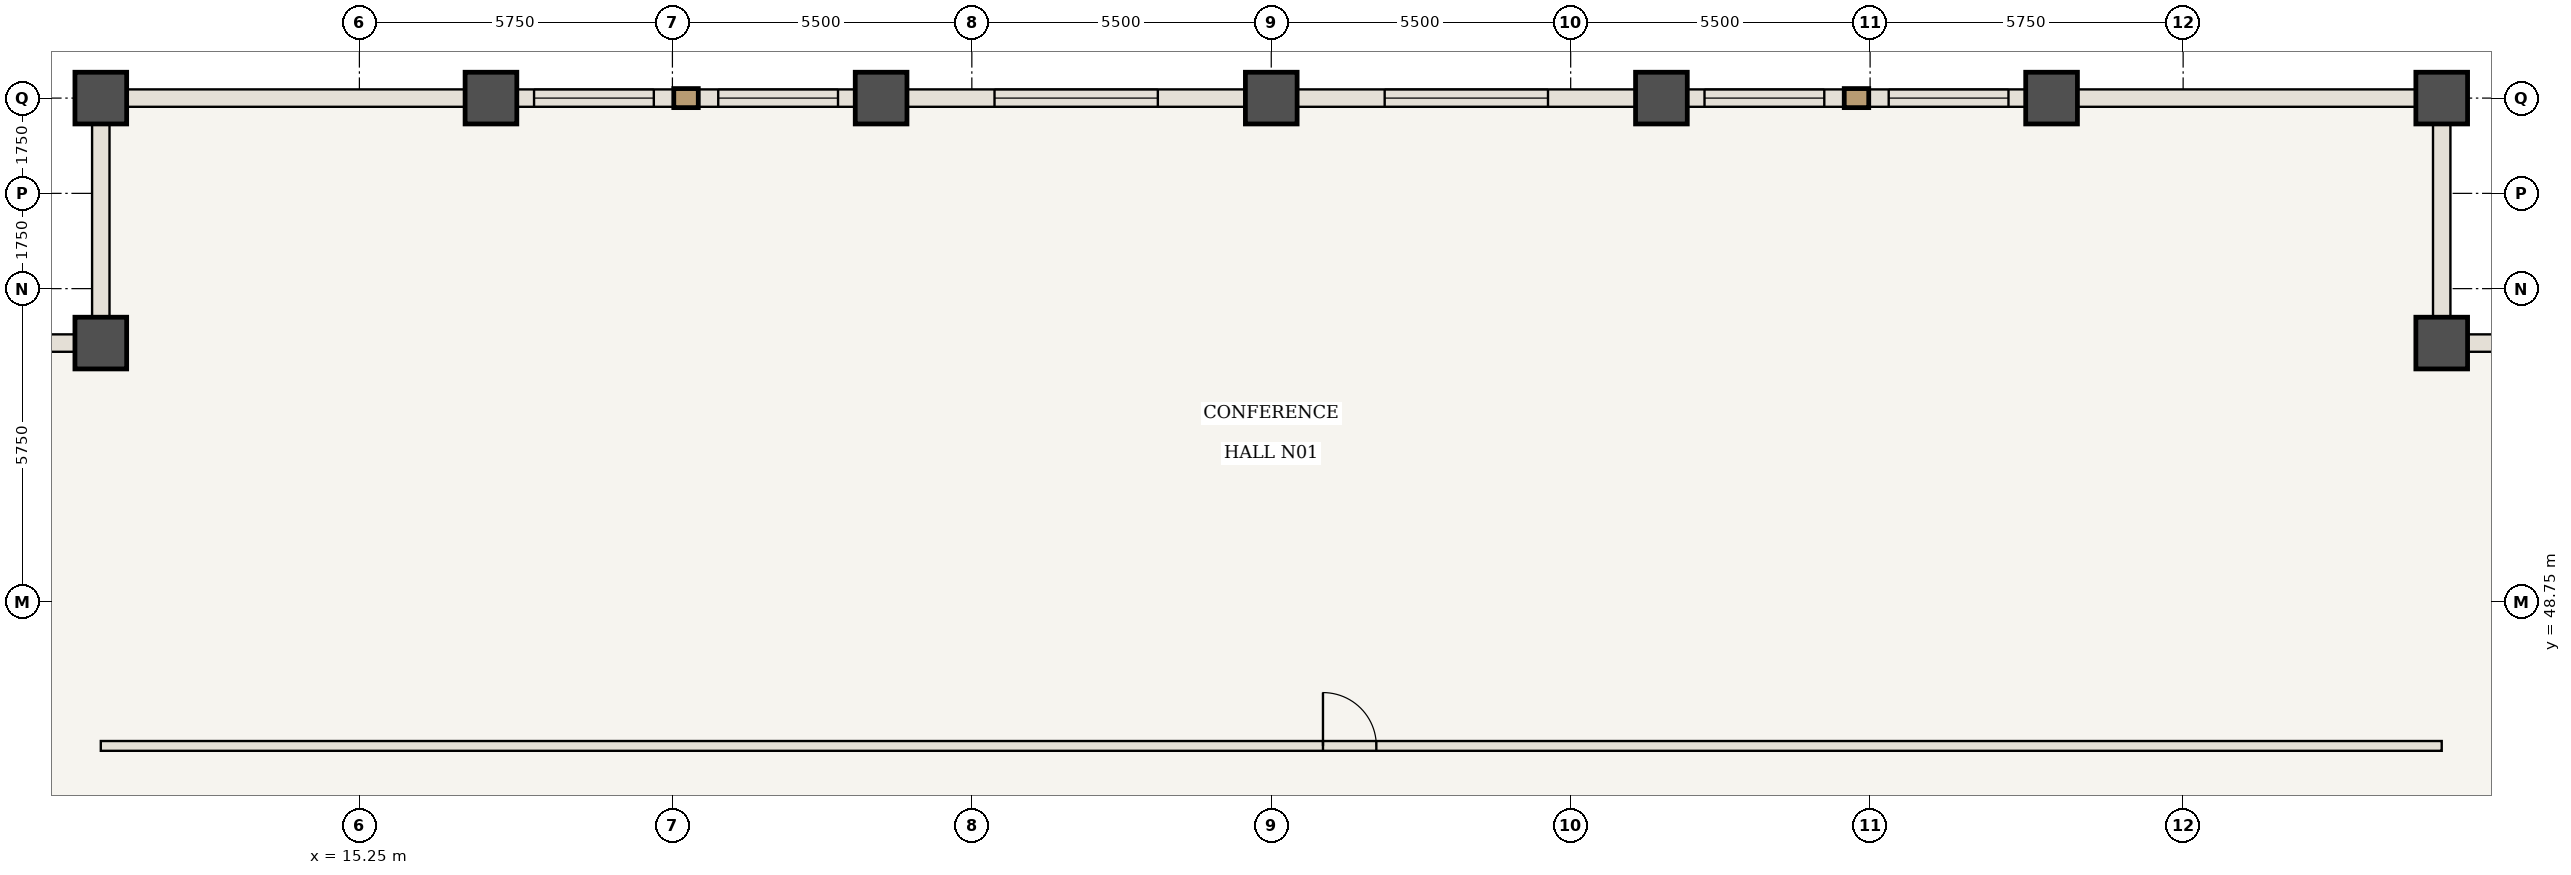
"""IFC4 building model, lengths in metres.
Left out: names, types, materials, properties, quantities, classifications, styles, units other than length and angle.
Written with IfcOpenShell. Run it as: python <this file> out.ifc"""

import sys

from ifc_helpers import new_model, si_unit, direction, frame, frame_2d, origin, origin_2d, place, context, subcontext, project, spatial, rectangle, extrude, element, fill, save


model = new_model("IFC4")
c1 = context("Model", 3, precision=1e-05, world=origin(), true_north=direction((0.0, 1.0)))
c2 = subcontext(c1, "Body", "Model", "MODEL_VIEW")
j1 = project(units=[si_unit("LENGTHUNIT", "METRE"), si_unit("PLANEANGLEUNIT", "RADIAN")], contexts=[c1])
p1 = place(None, origin())
s1 = spatial("IfcSite", under=j1, at=p1, CompositionType="ELEMENT")
p2 = place(p1, origin())
s2 = spatial("IfcBuilding", under=s1, at=p2, CompositionType="ELEMENT")
p3 = place(p2, frame((0.0, 0.0, 152.95)))
s3 = spatial("IfcBuildingStorey", under=s2, at=p3, CompositionType="ELEMENT", Elevation=152.95)
for number, where, z_axis, x_axis in (
    (1, (53.5, 53.5, 0.0), (0.0, 0.0, 1.0), (1.0, 0.0, 0.0)),
    (2, (53.5, 58.0, 0.0), (0.0, 0.0, 1.0), (1.0, 0.0, 0.0)),
    (3, (10.5, 58.0, 0.0), (0.0, 0.0, 1.0), (1.0, 0.0, 0.0)),
    (4, (10.5, 53.5, 0.0), (0.0, 0.0, 1.0), (1.0, 0.0, 0.0)),
    (5, (17.667, 58.0, 0.0), (0.0, 0.0, 1.0), (1.0, 0.0, 0.0)),
    (6, (24.833, 58.0, 0.0), (0.0, 0.0, 1.0), (1.0, 0.0, 0.0)),
    (7, (32.0, 58.0, 0.0), (0.0, 0.0, 1.0), (1.0, 0.0, 0.0)),
    (8, (39.167, 58.0, 0.0), (0.0, 0.0, 1.0), (1.0, 0.0, 0.0)),
    (9, (46.333, 58.0, 0.0), (0.0, 0.0, 1.0), (1.0, 0.0, 0.0)),
):
    element("IfcColumn", number, at=place(p3, frame(where, z_axis=z_axis, x_axis=x_axis)), inside=s3, PredefinedType="COLUMN", context=c2, shape_type="SweptSolid", body=[
        extrude(rectangle(XDim=0.95, YDim=0.95, at=origin_2d()), origin(), (0.0, 0.0, 1.0), 3.85),
    ])
p4 = place(p3, frame((10.5, 46.1, 0.0), z_axis=(0.0, 0.0, 1.0), x_axis=(1.0, 0.0, 0.0)))
e10 = element("IfcWall", 10, at=p4, inside=s3, PredefinedType="STANDARD", context=c2, shape_type="SweptSolid", body=[
    extrude(rectangle(XDim=43.0, YDim=0.18, at=frame_2d((21.5, 0.0))), origin(), (0.0, 0.0, 1.0), 3.685),
])
p5 = place(p4, frame((22.45, 0.0, 0.0)))
e11 = element("IfcOpeningElement", 11, at=p5, cuts=e10, PredefinedType="OPENING", context=c2, shape_type="SweptSolid", body=[
    extrude(rectangle(XDim=0.98, YDim=2.2, at=frame_2d((0.49, 1.1))), frame((0.0, 0.1, 0.0), z_axis=(0.0, -1.0, 0.0), x_axis=(1.0, 0.0, 0.0)), (0.0, 0.0, 1.0), 0.2),
])
p6 = place(p3, frame((10.5, 58.0, 0.0), z_axis=(0.0, 0.0, 1.0), x_axis=(1.0, 0.0, 0.0)))
e12 = element("IfcWall", 12, at=p6, inside=s3, PredefinedType="USERDEFINED", context=c2, shape_type="SweptSolid", body=[
    extrude(rectangle(XDim=7.167, YDim=0.32, at=frame_2d((3.583, 0.0))), origin(), (0.0, 0.0, 1.0), 2.885),
])
p7 = place(p3, frame((17.667, 58.0, 0.0), z_axis=(0.0, 0.0, 1.0), x_axis=(1.0, 0.0, 0.0)))
e13 = element("IfcWall", 13, at=p7, inside=s3, PredefinedType="USERDEFINED", context=c2, shape_type="SweptSolid", body=[
    extrude(rectangle(XDim=7.167, YDim=0.32, at=frame_2d((3.583, 0.0))), origin(), (0.0, 0.0, 1.0), 2.885),
])
p8 = place(p7, frame((0.792, 0.0, 0.85)))
e14 = element("IfcOpeningElement", 14, at=p8, cuts=e13, PredefinedType="OPENING", context=c2, shape_type="SweptSolid", body=[
    extrude(rectangle(XDim=2.2, YDim=1.835, at=frame_2d((1.1, 0.917))), frame((0.0, 0.17, 0.0), z_axis=(0.0, -1.0, 0.0), x_axis=(1.0, 0.0, 0.0)), (0.0, 0.0, 1.0), 0.34),
])
p9 = place(p7, frame((4.175, 0.0, 0.85)))
e15 = element("IfcOpeningElement", 15, at=p9, cuts=e13, PredefinedType="OPENING", context=c2, shape_type="SweptSolid", body=[
    extrude(rectangle(XDim=2.2, YDim=1.835, at=frame_2d((1.1, 0.917))), frame((0.0, 0.17, 0.0), z_axis=(0.0, -1.0, 0.0), x_axis=(1.0, 0.0, 0.0)), (0.0, 0.0, 1.0), 0.34),
])
p10 = place(p3, frame((24.833, 58.0, 0.0), z_axis=(0.0, 0.0, 1.0), x_axis=(1.0, 0.0, 0.0)))
e16 = element("IfcWall", 16, at=p10, inside=s3, PredefinedType="USERDEFINED", context=c2, shape_type="SweptSolid", body=[
    extrude(rectangle(XDim=7.167, YDim=0.32, at=frame_2d((3.583, 0.0))), origin(), (0.0, 0.0, 1.0), 2.885),
])
p11 = place(p10, frame((2.083, 0.0, 0.85)))
e17 = element("IfcOpeningElement", 17, at=p11, cuts=e16, PredefinedType="OPENING", context=c2, shape_type="SweptSolid", body=[
    extrude(rectangle(XDim=3.0, YDim=1.835, at=frame_2d((1.5, 0.917))), frame((0.0, 0.17, 0.0), z_axis=(0.0, -1.0, 0.0), x_axis=(1.0, 0.0, 0.0)), (0.0, 0.0, 1.0), 0.34),
])
p12 = place(p3, frame((32.0, 58.0, 0.0), z_axis=(0.0, 0.0, 1.0), x_axis=(1.0, 0.0, 0.0)))
e18 = element("IfcWall", 18, at=p12, inside=s3, PredefinedType="USERDEFINED", context=c2, shape_type="SweptSolid", body=[
    extrude(rectangle(XDim=7.167, YDim=0.32, at=frame_2d((3.583, 0.0))), origin(), (0.0, 0.0, 1.0), 2.885),
])
p13 = place(p12, frame((2.083, 0.0, 0.85)))
e19 = element("IfcOpeningElement", 19, at=p13, cuts=e18, PredefinedType="OPENING", context=c2, shape_type="SweptSolid", body=[
    extrude(rectangle(XDim=3.0, YDim=1.835, at=frame_2d((1.5, 0.917))), frame((0.0, 0.17, 0.0), z_axis=(0.0, -1.0, 0.0), x_axis=(1.0, 0.0, 0.0)), (0.0, 0.0, 1.0), 0.34),
])
p14 = place(p3, frame((39.167, 58.0, 0.0), z_axis=(0.0, 0.0, 1.0), x_axis=(1.0, 0.0, 0.0)))
e20 = element("IfcWall", 20, at=p14, inside=s3, PredefinedType="USERDEFINED", context=c2, shape_type="SweptSolid", body=[
    extrude(rectangle(XDim=7.167, YDim=0.32, at=frame_2d((3.583, 0.0))), origin(), (0.0, 0.0, 1.0), 2.885),
])
p15 = place(p14, frame((0.792, 0.0, 0.85)))
e21 = element("IfcOpeningElement", 21, at=p15, cuts=e20, PredefinedType="OPENING", context=c2, shape_type="SweptSolid", body=[
    extrude(rectangle(XDim=2.2, YDim=1.835, at=frame_2d((1.1, 0.917))), frame((0.0, 0.17, 0.0), z_axis=(0.0, -1.0, 0.0), x_axis=(1.0, 0.0, 0.0)), (0.0, 0.0, 1.0), 0.34),
])
p16 = place(p14, frame((4.175, 0.0, 0.85)))
e22 = element("IfcOpeningElement", 22, at=p16, cuts=e20, PredefinedType="OPENING", context=c2, shape_type="SweptSolid", body=[
    extrude(rectangle(XDim=2.2, YDim=1.835, at=frame_2d((1.1, 0.917))), frame((0.0, 0.17, 0.0), z_axis=(0.0, -1.0, 0.0), x_axis=(1.0, 0.0, 0.0)), (0.0, 0.0, 1.0), 0.34),
])
p17 = place(p3, frame((46.333, 58.0, 0.0), z_axis=(0.0, 0.0, 1.0), x_axis=(1.0, 0.0, 0.0)))
e23 = element("IfcWall", 23, at=p17, inside=s3, PredefinedType="USERDEFINED", context=c2, shape_type="SweptSolid", body=[
    extrude(rectangle(XDim=7.167, YDim=0.32, at=frame_2d((3.583, 0.0))), origin(), (0.0, 0.0, 1.0), 2.885),
])
for number, where, z_axis, x_axis in (
    (24, (53.5, 53.5, 0.0), (0.0, 0.0, 1.0), (1.0, 0.0, 0.0)),
    (25, (53.5, 58.0, 0.0), (0.0, 0.0, 1.0), (0.0, -1.0, 0.0)),
    (26, (10.5, 53.5, 0.0), (0.0, 0.0, 1.0), (0.0, 1.0, 0.0)),
    (27, (6.0, 53.5, 0.0), (0.0, 0.0, 1.0), (1.0, 0.0, 0.0)),
):
    element("IfcWall", number, at=place(p3, frame(where, z_axis=z_axis, x_axis=x_axis)), inside=s3, PredefinedType="USERDEFINED", context=c2, shape_type="SweptSolid", body=[
        extrude(rectangle(XDim=4.5, YDim=0.32, at=frame_2d((2.25, 0.0))), origin(), (0.0, 0.0, 1.0), 2.885),
    ])
p18 = place(p5, origin())
e28 = element("IfcDoor", 28, at=p18, inside=s3, OperationType="SINGLE_SWING_LEFT", PredefinedType="DOOR", context=c2, shape_type="SweptSolid", body=[
    extrude(rectangle(XDim=0.98, YDim=2.2, at=frame_2d((0.49, 1.1))), frame((0.0, 0.025, 0.0), z_axis=(0.0, -1.0, 0.0), x_axis=(1.0, 0.0, 0.0)), (0.0, 0.0, 1.0), 0.05),
])
fill(e11, e28)
p19 = place(p8, origin())
e29 = element("IfcWindow", 29, at=p19, inside=s3, PartitioningType="SINGLE_PANEL", PredefinedType="WINDOW", context=c2, shape_type="SweptSolid", body=[
    extrude(rectangle(XDim=2.2, YDim=1.835, at=frame_2d((1.1, 0.917))), frame((0.0, 0.03, 0.0), z_axis=(0.0, -1.0, 0.0), x_axis=(1.0, 0.0, 0.0)), (0.0, 0.0, 1.0), 0.06),
])
fill(e14, e29)
p20 = place(p9, origin())
e30 = element("IfcWindow", 30, at=p20, inside=s3, PartitioningType="SINGLE_PANEL", PredefinedType="WINDOW", context=c2, shape_type="SweptSolid", body=[
    extrude(rectangle(XDim=2.2, YDim=1.835, at=frame_2d((1.1, 0.917))), frame((0.0, 0.03, 0.0), z_axis=(0.0, -1.0, 0.0), x_axis=(1.0, 0.0, 0.0)), (0.0, 0.0, 1.0), 0.06),
])
fill(e15, e30)
p21 = place(p11, origin())
e31 = element("IfcWindow", 31, at=p21, inside=s3, PartitioningType="SINGLE_PANEL", PredefinedType="WINDOW", context=c2, shape_type="SweptSolid", body=[
    extrude(rectangle(XDim=3.0, YDim=1.835, at=frame_2d((1.5, 0.917))), frame((0.0, 0.03, 0.0), z_axis=(0.0, -1.0, 0.0), x_axis=(1.0, 0.0, 0.0)), (0.0, 0.0, 1.0), 0.06),
])
fill(e17, e31)
p22 = place(p13, origin())
e32 = element("IfcWindow", 32, at=p22, inside=s3, PartitioningType="SINGLE_PANEL", PredefinedType="WINDOW", context=c2, shape_type="SweptSolid", body=[
    extrude(rectangle(XDim=3.0, YDim=1.835, at=frame_2d((1.5, 0.917))), frame((0.0, 0.03, 0.0), z_axis=(0.0, -1.0, 0.0), x_axis=(1.0, 0.0, 0.0)), (0.0, 0.0, 1.0), 0.06),
])
fill(e19, e32)
p23 = place(p15, origin())
e33 = element("IfcWindow", 33, at=p23, inside=s3, PartitioningType="SINGLE_PANEL", PredefinedType="WINDOW", context=c2, shape_type="SweptSolid", body=[
    extrude(rectangle(XDim=2.2, YDim=1.835, at=frame_2d((1.1, 0.917))), frame((0.0, 0.03, 0.0), z_axis=(0.0, -1.0, 0.0), x_axis=(1.0, 0.0, 0.0)), (0.0, 0.0, 1.0), 0.06),
])
fill(e21, e33)
p24 = place(p16, origin())
e34 = element("IfcWindow", 34, at=p24, inside=s3, PartitioningType="SINGLE_PANEL", PredefinedType="WINDOW", context=c2, shape_type="SweptSolid", body=[
    extrude(rectangle(XDim=2.2, YDim=1.835, at=frame_2d((1.1, 0.917))), frame((0.0, 0.03, 0.0), z_axis=(0.0, -1.0, 0.0), x_axis=(1.0, 0.0, 0.0)), (0.0, 0.0, 1.0), 0.06),
])
fill(e22, e34)
save(model, sys.argv[1])
